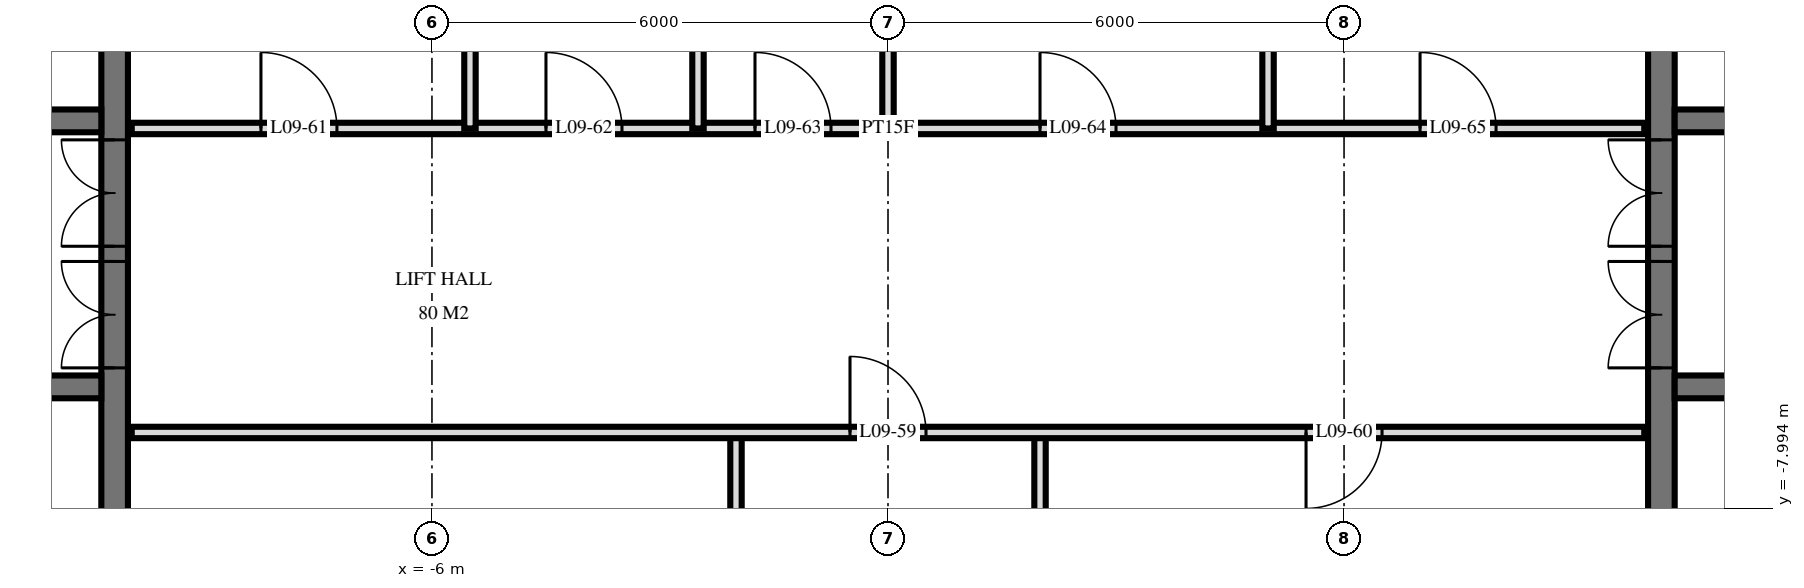
"""IFC4 building model, lengths in metres.
Left out: names, types, materials, properties, quantities, classifications, styles, units other than length and angle.
Written with IfcOpenShell. Run it as: python <this file> out.ifc"""

import sys

from ifc_helpers import new_model, si_unit, direction, frame, frame_2d, origin, place, context, subcontext, project, spatial, rectangle, extrude, element, fill, save


model = new_model("IFC4")
c1 = context("Model", 3, precision=1e-05, world=origin(), true_north=direction((0.0, 1.0)))
c2 = subcontext(c1, "Body", "Model", "MODEL_VIEW")
j1 = project(units=[si_unit("LENGTHUNIT", "METRE"), si_unit("PLANEANGLEUNIT", "RADIAN")], contexts=[c1])
p1 = place(None, origin())
s1 = spatial("IfcSite", under=j1, at=p1, CompositionType="ELEMENT")
p2 = place(p1, origin())
s2 = spatial("IfcBuilding", under=s1, at=p2, CompositionType="ELEMENT")
p3 = place(p2, frame((0.0, 0.0, 42.0)))
s3 = spatial("IfcBuildingStorey", under=s2, at=p3, CompositionType="ELEMENT", Elevation=42.0)
p4 = place(p3, frame((-10.175, -14.55, 0.0), z_axis=(0.0, 0.0, 1.0), x_axis=(0.0, 1.0, 0.0)))
e1 = element("IfcWall", 1, at=p4, inside=s3, PredefinedType="SHEAR", context=c2, shape_type="SweptSolid", body=[
    extrude(rectangle(XDim=14.1, YDim=0.35, at=frame_2d((7.05, 0.0))), origin(), (0.0, 0.0, 1.0), 3.6),
])
p5 = place(p4, frame((8.4, 0.0, 0.0)))
e2 = element("IfcOpeningElement", 2, at=p5, cuts=e1, PredefinedType="OPENING", context=c2, shape_type="SweptSolid", body=[
    extrude(rectangle(XDim=1.4, YDim=2.4, at=frame_2d((0.7, 1.2))), frame((0.0, 0.185, 0.0), z_axis=(0.0, -1.0, 0.0), x_axis=(1.0, 0.0, 0.0)), (0.0, 0.0, 1.0), 0.37),
])
p6 = place(p4, frame((10.0, 0.0, 0.0)))
e3 = element("IfcOpeningElement", 3, at=p6, cuts=e1, PredefinedType="OPENING", context=c2, shape_type="SweptSolid", body=[
    extrude(rectangle(XDim=1.4, YDim=2.4, at=frame_2d((0.7, 1.2))), frame((0.0, 0.185, 0.0), z_axis=(0.0, -1.0, 0.0), x_axis=(1.0, 0.0, 0.0)), (0.0, 0.0, 1.0), 0.37),
])
p7 = place(p4, frame((4.0, 0.0, 0.0)))
e4 = element("IfcOpeningElement", 4, at=p7, cuts=e1, PredefinedType="OPENING", context=c2, shape_type="SweptSolid", body=[
    extrude(rectangle(XDim=1.2, YDim=2.1, at=frame_2d((0.6, 1.05))), frame((0.0, 0.185, 0.0), z_axis=(0.0, -1.0, 0.0), x_axis=(1.0, 0.0, 0.0)), (0.0, 0.0, 1.0), 0.37),
])
p8 = place(p3, frame((-29.05, -2.9, 0.0), z_axis=(0.0, 0.0, 1.0), x_axis=(1.0, 0.0, 0.0)))
e5 = element("IfcWall", 5, at=p8, inside=s3, PredefinedType="SHEAR", context=c2, shape_type="SweptSolid", body=[
    extrude(rectangle(XDim=18.7, YDim=0.3, at=frame_2d((9.35, 0.0))), origin(), (0.0, 0.0, 1.0), 3.6),
])
p9 = place(p8, frame((2.95, 0.0, 0.0)))
e6 = element("IfcOpeningElement", 6, at=p9, cuts=e5, PredefinedType="OPENING", context=c2, shape_type="SweptSolid", body=[
    extrude(rectangle(XDim=1.1, YDim=2.1, at=frame_2d((0.55, 1.05))), frame((0.0, 0.16, 0.0), z_axis=(0.0, -1.0, 0.0), x_axis=(1.0, 0.0, 0.0)), (0.0, 0.0, 1.0), 0.32),
])
p10 = place(p8, frame((0.55, 0.0, 0.0)))
e7 = element("IfcOpeningElement", 7, at=p10, cuts=e5, PredefinedType="OPENING", context=c2, shape_type="SweptSolid", body=[
    extrude(rectangle(XDim=1.1, YDim=2.1, at=frame_2d((0.55, 1.05))), frame((0.0, 0.16, 0.0), z_axis=(0.0, -1.0, 0.0), x_axis=(1.0, 0.0, 0.0)), (0.0, 0.0, 1.0), 0.32),
])
p11 = place(p8, frame((10.9, 0.0, 0.0)))
e8 = element("IfcOpeningElement", 8, at=p11, cuts=e5, PredefinedType="OPENING", context=c2, shape_type="SweptSolid", body=[
    extrude(rectangle(XDim=0.9, YDim=2.1, at=frame_2d((0.45, 1.05))), frame((0.0, 0.16, 0.0), z_axis=(0.0, -1.0, 0.0), x_axis=(1.0, 0.0, 0.0)), (0.0, 0.0, 1.0), 0.32),
])
p12 = place(p8, frame((16.85, 0.0, 0.0)))
e9 = element("IfcOpeningElement", 9, at=p12, cuts=e5, PredefinedType="OPENING", context=c2, shape_type="SweptSolid", body=[
    extrude(rectangle(XDim=1.0, YDim=2.1, at=frame_2d((0.5, 1.05))), frame((0.0, 0.16, 0.0), z_axis=(0.0, -1.0, 0.0), x_axis=(1.0, 0.0, 0.0)), (0.0, 0.0, 1.0), 0.32),
])
p13 = place(p8, frame((14.312, 0.0, 0.0)))
e10 = element("IfcOpeningElement", 10, at=p13, cuts=e5, PredefinedType="OPENING", context=c2, shape_type="SweptSolid", body=[
    extrude(rectangle(XDim=1.0, YDim=2.1, at=frame_2d((0.5, 1.05))), frame((0.0, 0.16, 0.0), z_axis=(0.0, -1.0, 0.0), x_axis=(1.0, 0.0, 0.0)), (0.0, 0.0, 1.0), 0.32),
])
p14 = place(p8, frame((12.887, 0.0, 0.0)))
e11 = element("IfcOpeningElement", 11, at=p14, cuts=e5, PredefinedType="OPENING", context=c2, shape_type="SweptSolid", body=[
    extrude(rectangle(XDim=1.0, YDim=2.1, at=frame_2d((0.5, 1.05))), frame((0.0, 0.16, 0.0), z_axis=(0.0, -1.0, 0.0), x_axis=(1.0, 0.0, 0.0)), (0.0, 0.0, 1.0), 0.32),
])
p15 = place(p8, frame((5.6, 0.0, 0.0)))
e12 = element("IfcOpeningElement", 12, at=p15, cuts=e5, PredefinedType="OPENING", context=c2, shape_type="SweptSolid", body=[
    extrude(rectangle(XDim=1.0, YDim=2.1, at=frame_2d((0.5, 1.05))), frame((0.0, 0.16, 0.0), z_axis=(0.0, -1.0, 0.0), x_axis=(1.0, 0.0, 0.0)), (0.0, 0.0, 1.0), 0.32),
])
p16 = place(p3, frame((-29.05, -6.4, 0.0), z_axis=(0.0, 0.0, 1.0), x_axis=(1.0, 0.0, 0.0)))
e13 = element("IfcWall", 13, at=p16, inside=s3, PredefinedType="SHEAR", context=c2, shape_type="SweptSolid", body=[
    extrude(rectangle(XDim=18.7, YDim=0.3, at=frame_2d((9.35, 0.0))), origin(), (0.0, 0.0, 1.0), 3.6),
])
p17 = place(p16, frame((2.95, 0.0, 0.0)))
e14 = element("IfcOpeningElement", 14, at=p17, cuts=e13, PredefinedType="OPENING", context=c2, shape_type="SweptSolid", body=[
    extrude(rectangle(XDim=1.1, YDim=2.1, at=frame_2d((0.55, 1.05))), frame((0.0, 0.16, 0.0), z_axis=(0.0, -1.0, 0.0), x_axis=(1.0, 0.0, 0.0)), (0.0, 0.0, 1.0), 0.32),
])
p18 = place(p16, frame((0.55, 0.0, 0.0)))
e15 = element("IfcOpeningElement", 15, at=p18, cuts=e13, PredefinedType="OPENING", context=c2, shape_type="SweptSolid", body=[
    extrude(rectangle(XDim=1.1, YDim=2.1, at=frame_2d((0.55, 1.05))), frame((0.0, 0.16, 0.0), z_axis=(0.0, -1.0, 0.0), x_axis=(1.0, 0.0, 0.0)), (0.0, 0.0, 1.0), 0.32),
])
p19 = place(p16, frame((10.8, 0.0, 0.0)))
e16 = element("IfcOpeningElement", 16, at=p19, cuts=e13, PredefinedType="OPENING", context=c2, shape_type="SweptSolid", body=[
    extrude(rectangle(XDim=1.1, YDim=2.1, at=frame_2d((0.55, 1.05))), frame((0.0, 0.16, 0.0), z_axis=(0.0, -1.0, 0.0), x_axis=(1.0, 0.0, 0.0)), (0.0, 0.0, 1.0), 0.32),
])
p20 = place(p16, frame((5.6, 0.0, 0.0)))
e17 = element("IfcOpeningElement", 17, at=p20, cuts=e13, PredefinedType="OPENING", context=c2, shape_type="SweptSolid", body=[
    extrude(rectangle(XDim=1.0, YDim=2.1, at=frame_2d((0.5, 1.05))), frame((0.0, 0.16, 0.0), z_axis=(0.0, -1.0, 0.0), x_axis=(1.0, 0.0, 0.0)), (0.0, 0.0, 1.0), 0.32),
])
p21 = place(p3, frame((10.175, -14.55, 0.0), z_axis=(0.0, 0.0, 1.0), x_axis=(0.0, 1.0, 0.0)))
e18 = element("IfcWall", 18, at=p21, inside=s3, PredefinedType="SHEAR", context=c2, shape_type="SweptSolid", body=[
    extrude(rectangle(XDim=14.1, YDim=0.35, at=frame_2d((7.05, 0.0))), origin(), (0.0, 0.0, 1.0), 3.6),
])
p22 = place(p21, frame((8.4, 0.0, 0.0)))
e19 = element("IfcOpeningElement", 19, at=p22, cuts=e18, PredefinedType="OPENING", context=c2, shape_type="SweptSolid", body=[
    extrude(rectangle(XDim=1.4, YDim=2.4, at=frame_2d((0.7, 1.2))), frame((0.0, 0.185, 0.0), z_axis=(0.0, -1.0, 0.0), x_axis=(1.0, 0.0, 0.0)), (0.0, 0.0, 1.0), 0.37),
])
p23 = place(p21, frame((10.0, 0.0, 0.0)))
e20 = element("IfcOpeningElement", 20, at=p23, cuts=e18, PredefinedType="OPENING", context=c2, shape_type="SweptSolid", body=[
    extrude(rectangle(XDim=1.4, YDim=2.4, at=frame_2d((0.7, 1.2))), frame((0.0, 0.185, 0.0), z_axis=(0.0, -1.0, 0.0), x_axis=(1.0, 0.0, 0.0)), (0.0, 0.0, 1.0), 0.37),
])
p24 = place(p21, frame((4.0, 0.0, 0.0)))
e21 = element("IfcOpeningElement", 21, at=p24, cuts=e18, PredefinedType="OPENING", context=c2, shape_type="SweptSolid", body=[
    extrude(rectangle(XDim=1.2, YDim=2.1, at=frame_2d((0.6, 1.05))), frame((0.0, 0.185, 0.0), z_axis=(0.0, -1.0, 0.0), x_axis=(1.0, 0.0, 0.0)), (0.0, 0.0, 1.0), 0.37),
])
p25 = place(p3, frame((10.35, -2.9, 0.0), z_axis=(0.0, 0.0, 1.0), x_axis=(1.0, 0.0, 0.0)))
e22 = element("IfcWall", 22, at=p25, inside=s3, PredefinedType="SHEAR", context=c2, shape_type="SweptSolid", body=[
    extrude(rectangle(XDim=18.7, YDim=0.3, at=frame_2d((9.35, 0.0))), origin(), (0.0, 0.0, 1.0), 3.6),
])
p26 = place(p25, frame((14.65, 0.0, 0.0)))
e23 = element("IfcOpeningElement", 23, at=p26, cuts=e22, PredefinedType="OPENING", context=c2, shape_type="SweptSolid", body=[
    extrude(rectangle(XDim=1.1, YDim=2.1, at=frame_2d((0.55, 1.05))), frame((0.0, 0.16, 0.0), z_axis=(0.0, -1.0, 0.0), x_axis=(1.0, 0.0, 0.0)), (0.0, 0.0, 1.0), 0.32),
])
p27 = place(p25, frame((17.05, 0.0, 0.0)))
e24 = element("IfcOpeningElement", 24, at=p27, cuts=e22, PredefinedType="OPENING", context=c2, shape_type="SweptSolid", body=[
    extrude(rectangle(XDim=1.1, YDim=2.1, at=frame_2d((0.55, 1.05))), frame((0.0, 0.16, 0.0), z_axis=(0.0, -1.0, 0.0), x_axis=(1.0, 0.0, 0.0)), (0.0, 0.0, 1.0), 0.32),
])
p28 = place(p25, frame((6.9, 0.0, 0.0)))
e25 = element("IfcOpeningElement", 25, at=p28, cuts=e22, PredefinedType="OPENING", context=c2, shape_type="SweptSolid", body=[
    extrude(rectangle(XDim=0.9, YDim=2.1, at=frame_2d((0.45, 1.05))), frame((0.0, 0.16, 0.0), z_axis=(0.0, -1.0, 0.0), x_axis=(1.0, 0.0, 0.0)), (0.0, 0.0, 1.0), 0.32),
])
p29 = place(p25, frame((0.85, 0.0, 0.0)))
e26 = element("IfcOpeningElement", 26, at=p29, cuts=e22, PredefinedType="OPENING", context=c2, shape_type="SweptSolid", body=[
    extrude(rectangle(XDim=1.0, YDim=2.1, at=frame_2d((0.5, 1.05))), frame((0.0, 0.16, 0.0), z_axis=(0.0, -1.0, 0.0), x_axis=(1.0, 0.0, 0.0)), (0.0, 0.0, 1.0), 0.32),
])
p30 = place(p25, frame((3.387, 0.0, 0.0)))
e27 = element("IfcOpeningElement", 27, at=p30, cuts=e22, PredefinedType="OPENING", context=c2, shape_type="SweptSolid", body=[
    extrude(rectangle(XDim=1.0, YDim=2.1, at=frame_2d((0.5, 1.05))), frame((0.0, 0.16, 0.0), z_axis=(0.0, -1.0, 0.0), x_axis=(1.0, 0.0, 0.0)), (0.0, 0.0, 1.0), 0.32),
])
p31 = place(p25, frame((4.812, 0.0, 0.0)))
e28 = element("IfcOpeningElement", 28, at=p31, cuts=e22, PredefinedType="OPENING", context=c2, shape_type="SweptSolid", body=[
    extrude(rectangle(XDim=1.0, YDim=2.1, at=frame_2d((0.5, 1.05))), frame((0.0, 0.16, 0.0), z_axis=(0.0, -1.0, 0.0), x_axis=(1.0, 0.0, 0.0)), (0.0, 0.0, 1.0), 0.32),
])
p32 = place(p25, frame((12.1, 0.0, 0.0)))
e29 = element("IfcOpeningElement", 29, at=p32, cuts=e22, PredefinedType="OPENING", context=c2, shape_type="SweptSolid", body=[
    extrude(rectangle(XDim=1.0, YDim=2.1, at=frame_2d((0.5, 1.05))), frame((0.0, 0.16, 0.0), z_axis=(0.0, -1.0, 0.0), x_axis=(1.0, 0.0, 0.0)), (0.0, 0.0, 1.0), 0.32),
])
p33 = place(p3, frame((10.35, -6.4, 0.0), z_axis=(0.0, 0.0, 1.0), x_axis=(1.0, 0.0, 0.0)))
e30 = element("IfcWall", 30, at=p33, inside=s3, PredefinedType="SHEAR", context=c2, shape_type="SweptSolid", body=[
    extrude(rectangle(XDim=18.7, YDim=0.3, at=frame_2d((9.35, 0.0))), origin(), (0.0, 0.0, 1.0), 3.6),
])
p34 = place(p33, frame((14.65, 0.0, 0.0)))
e31 = element("IfcOpeningElement", 31, at=p34, cuts=e30, PredefinedType="OPENING", context=c2, shape_type="SweptSolid", body=[
    extrude(rectangle(XDim=1.1, YDim=2.1, at=frame_2d((0.55, 1.05))), frame((0.0, 0.16, 0.0), z_axis=(0.0, -1.0, 0.0), x_axis=(1.0, 0.0, 0.0)), (0.0, 0.0, 1.0), 0.32),
])
p35 = place(p33, frame((17.05, 0.0, 0.0)))
e32 = element("IfcOpeningElement", 32, at=p35, cuts=e30, PredefinedType="OPENING", context=c2, shape_type="SweptSolid", body=[
    extrude(rectangle(XDim=1.1, YDim=2.1, at=frame_2d((0.55, 1.05))), frame((0.0, 0.16, 0.0), z_axis=(0.0, -1.0, 0.0), x_axis=(1.0, 0.0, 0.0)), (0.0, 0.0, 1.0), 0.32),
])
p36 = place(p33, frame((6.8, 0.0, 0.0)))
e33 = element("IfcOpeningElement", 33, at=p36, cuts=e30, PredefinedType="OPENING", context=c2, shape_type="SweptSolid", body=[
    extrude(rectangle(XDim=1.1, YDim=2.1, at=frame_2d((0.55, 1.05))), frame((0.0, 0.16, 0.0), z_axis=(0.0, -1.0, 0.0), x_axis=(1.0, 0.0, 0.0)), (0.0, 0.0, 1.0), 0.32),
])
p37 = place(p33, frame((12.1, 0.0, 0.0)))
e34 = element("IfcOpeningElement", 34, at=p37, cuts=e30, PredefinedType="OPENING", context=c2, shape_type="SweptSolid", body=[
    extrude(rectangle(XDim=1.0, YDim=2.1, at=frame_2d((0.5, 1.05))), frame((0.0, 0.16, 0.0), z_axis=(0.0, -1.0, 0.0), x_axis=(1.0, 0.0, 0.0)), (0.0, 0.0, 1.0), 0.32),
])
p38 = place(p3, frame((5.0, -3.0, 0.0), z_axis=(0.0, 0.0, 1.0), x_axis=(0.0, 1.0, 0.0)))
e35 = element("IfcWall", 35, at=p38, inside=s3, PredefinedType="PARTITIONING", context=c2, shape_type="SweptSolid", body=[
    extrude(rectangle(XDim=4.02, YDim=0.15, at=frame_2d((2.01, 0.0))), origin(), (0.0, 0.0, 1.0), 3.32),
])
p39 = place(p3, frame((2.0, -11.0, 0.0), z_axis=(0.0, 0.0, 1.0), x_axis=(0.0, 1.0, 0.0)))
e36 = element("IfcWall", 36, at=p39, inside=s3, PredefinedType="PARTITIONING", context=c2, shape_type="SweptSolid", body=[
    extrude(rectangle(XDim=4.0, YDim=0.15, at=frame_2d((2.0, 0.0))), origin(), (0.0, 0.0, 1.0), 3.32),
])
p40 = place(p3, frame((0.0, -3.0, 0.0), z_axis=(0.0, 0.0, 1.0), x_axis=(0.0, 1.0, 0.0)))
e37 = element("IfcWall", 37, at=p40, inside=s3, PredefinedType="PLUMBINGWALL", context=c2, shape_type="SweptSolid", body=[
    extrude(rectangle(XDim=4.02, YDim=0.15, at=frame_2d((2.01, 0.0))), origin(), (0.0, 0.0, 1.0), 3.32),
])
p41 = place(p3, frame((-2.0, -11.0, 0.0), z_axis=(0.0, 0.0, 1.0), x_axis=(0.0, 1.0, 0.0)))
e38 = element("IfcWall", 38, at=p41, inside=s3, PredefinedType="PARTITIONING", context=c2, shape_type="SweptSolid", body=[
    extrude(rectangle(XDim=4.0, YDim=0.15, at=frame_2d((2.0, 0.0))), origin(), (0.0, 0.0, 1.0), 3.32),
])
for number, where, z_axis, x_axis in (
    (39, (-2.5, -3.0, 0.0), (0.0, 0.0, 1.0), (0.0, 1.0, 0.0)),
    (40, (-5.5, -3.0, 0.0), (0.0, 0.0, 1.0), (0.0, 1.0, 0.0)),
):
    element("IfcWall", number, at=place(p3, frame(where, z_axis=z_axis, x_axis=x_axis)), inside=s3, PredefinedType="PLUMBINGWALL", context=c2, shape_type="SweptSolid", body=[
        extrude(rectangle(XDim=4.02, YDim=0.15, at=frame_2d((2.01, 0.0))), origin(), (0.0, 0.0, 1.0), 3.32),
    ])
p42 = place(p3, frame((-9.95, -7.0, 0.0), z_axis=(0.0, 0.0, 1.0), x_axis=(1.0, 0.0, 0.0)))
e41 = element("IfcWall", 41, at=p42, inside=s3, PredefinedType="PARTITIONING", context=c2, shape_type="SweptSolid", body=[
    extrude(rectangle(XDim=19.9, YDim=0.15, at=frame_2d((9.95, 0.0))), origin(), (0.0, 0.0, 1.0), 3.32),
])
p43 = place(p42, frame((9.45, 0.0, 0.0)))
e42 = element("IfcOpeningElement", 42, at=p43, cuts=e41, PredefinedType="OPENING", context=c2, shape_type="SweptSolid", body=[
    extrude(rectangle(XDim=1.0, YDim=2.1, at=frame_2d((0.5, 1.05))), frame((0.0, 0.085, 0.0), z_axis=(0.0, -1.0, 0.0), x_axis=(1.0, 0.0, 0.0)), (0.0, 0.0, 1.0), 0.17),
])
p44 = place(p42, frame((15.45, 0.0, 0.0)))
e43 = element("IfcOpeningElement", 43, at=p44, cuts=e41, PredefinedType="OPENING", context=c2, shape_type="SweptSolid", body=[
    extrude(rectangle(XDim=1.0, YDim=2.1, at=frame_2d((0.5, 1.05))), frame((0.0, 0.085, 0.0), z_axis=(0.0, -1.0, 0.0), x_axis=(1.0, 0.0, 0.0)), (0.0, 0.0, 1.0), 0.17),
])
p45 = place(p3, frame((-9.95, -3.0, 0.0), z_axis=(0.0, 0.0, 1.0), x_axis=(1.0, 0.0, 0.0)))
e44 = element("IfcWall", 44, at=p45, inside=s3, PredefinedType="PARTITIONING", context=c2, shape_type="SweptSolid", body=[
    extrude(rectangle(XDim=19.9, YDim=0.15, at=frame_2d((9.95, 0.0))), origin(), (0.0, 0.0, 1.0), 3.32),
])
p46 = place(p45, frame((1.7, 0.0, 0.0)))
e45 = element("IfcOpeningElement", 45, at=p46, cuts=e44, PredefinedType="OPENING", context=c2, shape_type="SweptSolid", body=[
    extrude(rectangle(XDim=1.0, YDim=2.1, at=frame_2d((0.5, 1.05))), frame((0.0, 0.085, 0.0), z_axis=(0.0, -1.0, 0.0), x_axis=(1.0, 0.0, 0.0)), (0.0, 0.0, 1.0), 0.17),
])
p47 = place(p45, frame((5.45, 0.0, 0.0)))
e46 = element("IfcOpeningElement", 46, at=p47, cuts=e44, PredefinedType="OPENING", context=c2, shape_type="SweptSolid", body=[
    extrude(rectangle(XDim=1.0, YDim=2.1, at=frame_2d((0.5, 1.05))), frame((0.0, 0.085, 0.0), z_axis=(0.0, -1.0, 0.0), x_axis=(1.0, 0.0, 0.0)), (0.0, 0.0, 1.0), 0.17),
])
p48 = place(p45, frame((8.2, 0.0, 0.0)))
e47 = element("IfcOpeningElement", 47, at=p48, cuts=e44, PredefinedType="OPENING", context=c2, shape_type="SweptSolid", body=[
    extrude(rectangle(XDim=1.0, YDim=2.1, at=frame_2d((0.5, 1.05))), frame((0.0, 0.085, 0.0), z_axis=(0.0, -1.0, 0.0), x_axis=(1.0, 0.0, 0.0)), (0.0, 0.0, 1.0), 0.17),
])
p49 = place(p45, frame((11.95, 0.0, 0.0)))
e48 = element("IfcOpeningElement", 48, at=p49, cuts=e44, PredefinedType="OPENING", context=c2, shape_type="SweptSolid", body=[
    extrude(rectangle(XDim=1.0, YDim=2.1, at=frame_2d((0.5, 1.05))), frame((0.0, 0.085, 0.0), z_axis=(0.0, -1.0, 0.0), x_axis=(1.0, 0.0, 0.0)), (0.0, 0.0, 1.0), 0.17),
])
p50 = place(p45, frame((16.95, 0.0, 0.0)))
e49 = element("IfcOpeningElement", 49, at=p50, cuts=e44, PredefinedType="OPENING", context=c2, shape_type="SweptSolid", body=[
    extrude(rectangle(XDim=1.0, YDim=2.1, at=frame_2d((0.5, 1.05))), frame((0.0, 0.085, 0.0), z_axis=(0.0, -1.0, 0.0), x_axis=(1.0, 0.0, 0.0)), (0.0, 0.0, 1.0), 0.17),
])
p51 = place(p5, origin())
e50 = element("IfcDoor", 50, at=p51, inside=s3, OperationType="DOUBLE_DOOR_SINGLE_SWING", PredefinedType="DOOR", context=c2, shape_type="SweptSolid", body=[
    extrude(rectangle(XDim=1.4, YDim=2.4, at=frame_2d((0.7, 1.2))), frame((0.0, 0.025, 0.0), z_axis=(0.0, -1.0, 0.0), x_axis=(1.0, 0.0, 0.0)), (0.0, 0.0, 1.0), 0.05),
])
fill(e2, e50)
p52 = place(p6, origin())
e51 = element("IfcDoor", 51, at=p52, inside=s3, OperationType="DOUBLE_DOOR_SINGLE_SWING", PredefinedType="DOOR", context=c2, shape_type="SweptSolid", body=[
    extrude(rectangle(XDim=1.4, YDim=2.4, at=frame_2d((0.7, 1.2))), frame((0.0, 0.025, 0.0), z_axis=(0.0, -1.0, 0.0), x_axis=(1.0, 0.0, 0.0)), (0.0, 0.0, 1.0), 0.05),
])
fill(e3, e51)
p53 = place(p22, origin())
e52 = element("IfcDoor", 52, at=p53, inside=s3, OperationType="DOUBLE_DOOR_SINGLE_SWING", PredefinedType="DOOR", context=c2, shape_type="SweptSolid", body=[
    extrude(rectangle(XDim=1.4, YDim=2.4, at=frame_2d((0.7, 1.2))), frame((0.0, 0.025, 0.0), z_axis=(0.0, -1.0, 0.0), x_axis=(1.0, 0.0, 0.0)), (0.0, 0.0, 1.0), 0.05),
])
fill(e19, e52)
p54 = place(p23, origin())
e53 = element("IfcDoor", 53, at=p54, inside=s3, OperationType="DOUBLE_DOOR_SINGLE_SWING", PredefinedType="DOOR", context=c2, shape_type="SweptSolid", body=[
    extrude(rectangle(XDim=1.4, YDim=2.4, at=frame_2d((0.7, 1.2))), frame((0.0, 0.025, 0.0), z_axis=(0.0, -1.0, 0.0), x_axis=(1.0, 0.0, 0.0)), (0.0, 0.0, 1.0), 0.05),
])
fill(e20, e53)
p55 = place(p43, origin())
e54 = element("IfcDoor", 54, at=p55, inside=s3, OperationType="SINGLE_SWING_RIGHT", PredefinedType="DOOR", context=c2, shape_type="SweptSolid", body=[
    extrude(rectangle(XDim=1.0, YDim=2.1, at=frame_2d((0.5, 1.05))), frame((0.0, 0.025, 0.0), z_axis=(0.0, -1.0, 0.0), x_axis=(1.0, 0.0, 0.0)), (0.0, 0.0, 1.0), 0.05),
])
fill(e42, e54)
p56 = place(p44, frame((0.5, 0.0, 0.0), z_axis=(0.0, 0.0, 1.0), x_axis=(-1.0, 0.0, 0.0)))
e55 = element("IfcDoor", 55, at=p56, inside=s3, OperationType="SINGLE_SWING_LEFT", PredefinedType="DOOR", context=c2, shape_type="SweptSolid", body=[
    extrude(rectangle(XDim=1.0, YDim=2.1, at=frame_2d((0.0, 1.05))), frame((0.0, -0.025, 0.0), z_axis=(0.0, 1.0, 0.0), x_axis=(-1.0, 0.0, 0.0)), (0.0, 0.0, 1.0), 0.05),
])
fill(e43, e55)
p57 = place(p46, origin())
e56 = element("IfcDoor", 56, at=p57, inside=s3, OperationType="SINGLE_SWING_RIGHT", PredefinedType="DOOR", context=c2, shape_type="SweptSolid", body=[
    extrude(rectangle(XDim=1.0, YDim=2.1, at=frame_2d((0.5, 1.05))), frame((0.0, 0.025, 0.0), z_axis=(0.0, -1.0, 0.0), x_axis=(1.0, 0.0, 0.0)), (0.0, 0.0, 1.0), 0.05),
])
fill(e45, e56)
p58 = place(p47, origin())
e57 = element("IfcDoor", 57, at=p58, inside=s3, OperationType="SINGLE_SWING_RIGHT", PredefinedType="DOOR", context=c2, shape_type="SweptSolid", body=[
    extrude(rectangle(XDim=1.0, YDim=2.1, at=frame_2d((0.5, 1.05))), frame((0.0, 0.025, 0.0), z_axis=(0.0, -1.0, 0.0), x_axis=(1.0, 0.0, 0.0)), (0.0, 0.0, 1.0), 0.05),
])
fill(e46, e57)
p59 = place(p48, origin())
e58 = element("IfcDoor", 58, at=p59, inside=s3, OperationType="SINGLE_SWING_RIGHT", PredefinedType="DOOR", context=c2, shape_type="SweptSolid", body=[
    extrude(rectangle(XDim=1.0, YDim=2.1, at=frame_2d((0.5, 1.05))), frame((0.0, 0.025, 0.0), z_axis=(0.0, -1.0, 0.0), x_axis=(1.0, 0.0, 0.0)), (0.0, 0.0, 1.0), 0.05),
])
fill(e47, e58)
p60 = place(p49, origin())
e59 = element("IfcDoor", 59, at=p60, inside=s3, OperationType="SINGLE_SWING_RIGHT", PredefinedType="DOOR", context=c2, shape_type="SweptSolid", body=[
    extrude(rectangle(XDim=1.0, YDim=2.1, at=frame_2d((0.5, 1.05))), frame((0.0, 0.025, 0.0), z_axis=(0.0, -1.0, 0.0), x_axis=(1.0, 0.0, 0.0)), (0.0, 0.0, 1.0), 0.05),
])
fill(e48, e59)
p61 = place(p50, origin())
e60 = element("IfcDoor", 60, at=p61, inside=s3, OperationType="SINGLE_SWING_RIGHT", PredefinedType="DOOR", context=c2, shape_type="SweptSolid", body=[
    extrude(rectangle(XDim=1.0, YDim=2.1, at=frame_2d((0.5, 1.05))), frame((0.0, 0.025, 0.0), z_axis=(0.0, -1.0, 0.0), x_axis=(1.0, 0.0, 0.0)), (0.0, 0.0, 1.0), 0.05),
])
fill(e49, e60)
save(model, sys.argv[1])
